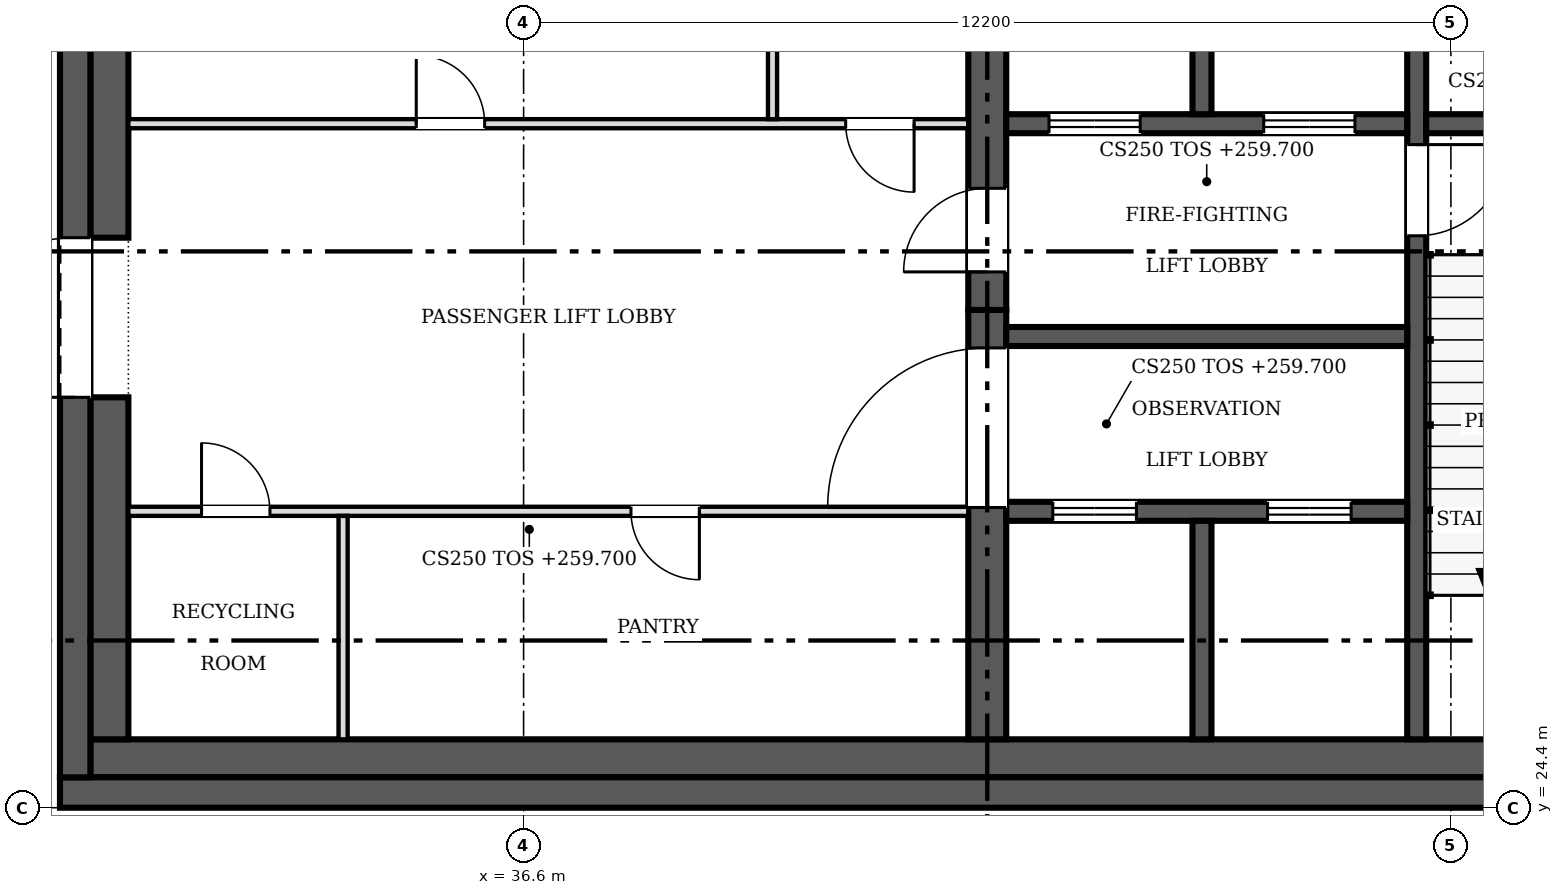
"""IFC4 building model, lengths in metres.
Left out: names, types, materials, properties, quantities, classifications, styles, units other than length and angle.
Written with IfcOpenShell. Run it as: python <this file> out.ifc"""

import sys

from ifc_helpers import new_model, si_unit, direction, frame, frame_2d, origin, place, context, subcontext, project, spatial, rectangle, extrude, source, transform, mapped, element, fill, save


model = new_model("IFC4")
c1 = context("Model", 3, precision=1e-05, world=origin(), true_north=direction((0.0, 1.0)))
c2 = subcontext(c1, "Body", "Model", "MODEL_VIEW")
j1 = project(units=[si_unit("LENGTHUNIT", "METRE"), si_unit("PLANEANGLEUNIT", "RADIAN")], contexts=[c1])
p1 = place(None, origin())
s1 = spatial("IfcSite", under=j1, at=p1, CompositionType="ELEMENT")
p2 = place(p1, origin())
s2 = spatial("IfcBuilding", under=s1, at=p2, CompositionType="ELEMENT")
p3 = place(p2, frame((0.0, 0.0, 259.7)))
s3 = spatial("IfcBuildingStorey", under=s2, at=p3, CompositionType="ELEMENT", Elevation=259.7)
p4 = place(p3, frame((54.9, 24.6, 0.0), z_axis=(0.0, 0.0, 1.0), x_axis=(-1.0, 0.0, 0.0)))
e1 = element("IfcWall", 1, at=p4, inside=s3, PredefinedType="SHEAR", context=c2, shape_type="SweptSolid", body=[
    extrude(rectangle(XDim=24.4, YDim=0.4, at=frame_2d((12.2, 0.0))), origin(), (0.0, 0.0, 1.0), 6.0),
])
m1 = source(origin(), c2, "Body", "SweptSolid", [
    extrude(rectangle(XDim=1.2, YDim=2.1, at=frame_2d((0.6, 1.05))), frame((0.0, 0.21, 0.0), z_axis=(0.0, -1.0, 0.0), x_axis=(1.0, 0.0, 0.0)), (0.0, 0.0, 1.0), 0.42),
])
p5 = place(p4, frame((1.5, 0.0, 0.0)))
e2 = element("IfcOpeningElement", 2, at=p5, cuts=e1, PredefinedType="OPENING", context=c2, shape_type="MappedRepresentation", body=[
    mapped(m1, transform((0.0, 0.0, 0.0), scale=1.0)),
])
p6 = place(p3, frame((30.7, 24.8, 0.0), z_axis=(0.0, 0.0, 1.0), x_axis=(0.0, 1.0, 0.0)))
e3 = element("IfcWall", 3, at=p6, inside=s3, PredefinedType="SHEAR", context=c2, shape_type="SweptSolid", body=[
    extrude(rectangle(XDim=23.6, YDim=0.4, at=frame_2d((11.8, 0.0))), origin(), (0.0, 0.0, 1.0), 6.0),
])
m2 = source(origin(), c2, "Body", "SweptSolid", [
    extrude(rectangle(XDim=2.1, YDim=2.4, at=frame_2d((1.05, 1.2))), frame((0.0, 0.21, 0.0), z_axis=(0.0, -1.0, 0.0), x_axis=(1.0, 0.0, 0.0)), (0.0, 0.0, 1.0), 0.42),
])
p7 = place(p6, frame((5.0, 0.0, 0.0)))
e4 = element("IfcOpeningElement", 4, at=p7, cuts=e3, PredefinedType="OPENING", context=c2, shape_type="MappedRepresentation", body=[
    mapped(m2, transform((0.0, 0.0, 0.0), scale=1.0)),
])
p8 = place(p6, frame((16.5, 0.0, 0.0)))
e5 = element("IfcOpeningElement", 5, at=p8, cuts=e3, PredefinedType="OPENING", context=c2, shape_type="MappedRepresentation", body=[
    mapped(m2, transform((0.0, 0.0, 0.0), scale=1.0)),
])
p9 = place(p3, frame((30.9, 25.05, 0.0), z_axis=(0.0, 0.0, 1.0), x_axis=(1.0, 0.0, 0.0)))
e6 = element("IfcWall", 6, at=p9, inside=s3, PredefinedType="SOLIDWALL", context=c2, shape_type="SweptSolid", body=[
    extrude(rectangle(XDim=21.3, YDim=0.5, at=frame_2d((10.65, 0.0))), origin(), (0.0, 0.0, 1.0), 6.0),
])
p10 = place(p3, frame((31.15, 25.3, 0.0), z_axis=(0.0, 0.0, 1.0), x_axis=(0.0, 1.0, 0.0)))
e7 = element("IfcWall", 7, at=p10, inside=s3, PredefinedType="SOLIDWALL", context=c2, shape_type="SweptSolid", body=[
    extrude(rectangle(XDim=4.5, YDim=0.5, at=frame_2d((2.25, 0.0))), origin(), (0.0, 0.0, 1.0), 6.0),
])
p11 = place(p3, frame((31.15, 31.9, 0.0), z_axis=(0.0, 0.0, 1.0), x_axis=(0.0, 1.0, 0.0)))
e8 = element("IfcWall", 8, at=p11, inside=s3, PredefinedType="SOLIDWALL", context=c2, shape_type="SweptSolid", body=[
    extrude(rectangle(XDim=9.4, YDim=0.5, at=frame_2d((4.7, 0.0))), origin(), (0.0, 0.0, 1.0), 6.0),
])
p12 = place(p3, frame((42.7, 25.3, 0.0), z_axis=(0.0, 0.0, 1.0), x_axis=(0.0, 1.0, 0.0)))
e9 = element("IfcWall", 9, at=p12, inside=s3, PredefinedType="SHEAR", context=c2, shape_type="SweptSolid", body=[
    extrude(rectangle(XDim=5.65, YDim=0.5, at=frame_2d((2.825, 0.0))), origin(), (0.0, 0.0, 1.0), 6.0),
])
m3 = source(origin(), c2, "Body", "SweptSolid", [
    extrude(rectangle(XDim=2.1, YDim=2.4, at=frame_2d((1.05, 1.2))), frame((0.0, 0.26, 0.0), z_axis=(0.0, -1.0, 0.0), x_axis=(1.0, 0.0, 0.0)), (0.0, 0.0, 1.0), 0.52),
])
p13 = place(p12, frame((3.05, 0.0, 0.0)))
e10 = element("IfcOpeningElement", 10, at=p13, cuts=e9, PredefinedType="OPENING", context=c2, shape_type="MappedRepresentation", body=[
    mapped(m3, transform((0.0, 0.0, 0.0), scale=1.0)),
])
p14 = place(p3, frame((42.7, 36.35, 0.0), z_axis=(0.0, 0.0, 1.0), x_axis=(0.0, -1.0, 0.0)))
e11 = element("IfcWall", 11, at=p14, inside=s3, PredefinedType="SHEAR", context=c2, shape_type="SweptSolid", body=[
    extrude(rectangle(XDim=5.4, YDim=0.5, at=frame_2d((2.7, 0.0))), origin(), (0.0, 0.0, 1.0), 6.0),
])
m4 = source(origin(), c2, "Body", "SweptSolid", [
    extrude(rectangle(XDim=1.1, YDim=2.1, at=frame_2d((0.55, 1.05))), frame((0.0, 0.26, 0.0), z_axis=(0.0, -1.0, 0.0), x_axis=(1.0, 0.0, 0.0)), (0.0, 0.0, 1.0), 0.52),
])
p15 = place(p14, frame((3.8, 0.0, 0.0)))
e12 = element("IfcOpeningElement", 12, at=p15, cuts=e11, PredefinedType="OPENING", context=c2, shape_type="MappedRepresentation", body=[
    mapped(m4, transform((0.0, 0.0, 0.0), scale=1.0)),
])
p16 = place(p3, frame((48.35, 36.35, 0.0), z_axis=(0.0, 0.0, 1.0), x_axis=(0.0, -1.0, 0.0)))
e13 = element("IfcWall", 13, at=p16, inside=s3, PredefinedType="SOLIDWALL", context=c2, shape_type="SweptSolid", body=[
    extrude(rectangle(XDim=11.05, YDim=0.25, at=frame_2d((5.525, 0.0))), origin(), (0.0, 0.0, 1.0), 6.0),
])
m5 = source(origin(), c2, "Body", "SweptSolid", [
    extrude(rectangle(XDim=1.2, YDim=2.1, at=frame_2d((0.6, 1.05))), frame((0.0, 0.135, 0.0), z_axis=(0.0, -1.0, 0.0), x_axis=(1.0, 0.0, 0.0)), (0.0, 0.0, 1.0), 0.27),
])
p17 = place(p16, frame((3.225, 0.0, 0.0)))
e14 = element("IfcOpeningElement", 14, at=p17, cuts=e13, PredefinedType="OPENING", context=c2, shape_type="MappedRepresentation", body=[
    mapped(m5, transform((0.0, 0.0, 0.0), scale=1.0)),
])
p18 = place(p3, frame((48.225, 33.4, 0.0), z_axis=(0.0, 0.0, 1.0), x_axis=(-1.0, 0.0, 0.0)))
e15 = element("IfcWall", 15, at=p18, inside=s3, PredefinedType="SOLIDWALL", context=c2, shape_type="SweptSolid", body=[
    extrude(rectangle(XDim=5.275, YDim=0.25, at=frame_2d((2.638, 0.0))), origin(), (0.0, 0.0, 1.0), 6.0),
])
p19 = place(p18, frame((3.512, 0.0, 0.0)))
e16 = element("IfcOpeningElement", 16, at=p19, cuts=e15, PredefinedType="OPENING", context=c2, shape_type="MappedRepresentation", body=[
    mapped(m5, transform((0.0, 0.0, 0.0), scale=1.0)),
])
p20 = place(p18, frame((0.688, 0.0, 0.0)))
e17 = element("IfcOpeningElement", 17, at=p20, cuts=e15, PredefinedType="OPENING", context=c2, shape_type="MappedRepresentation", body=[
    mapped(m5, transform((0.0, 0.0, 0.0), scale=1.0)),
])
p21 = place(p3, frame((48.475, 33.4, 0.0), z_axis=(0.0, 0.0, 1.0), x_axis=(1.0, 0.0, 0.0)))
e18 = element("IfcWall", 18, at=p21, inside=s3, PredefinedType="SOLIDWALL", context=c2, shape_type="SweptSolid", body=[
    extrude(rectangle(XDim=3.525, YDim=0.25, at=frame_2d((1.762, 0.0))), origin(), (0.0, 0.0, 1.0), 6.0),
])
p22 = place(p3, frame((42.95, 28.3, 0.0), z_axis=(0.0, 0.0, 1.0), x_axis=(1.0, 0.0, 0.0)))
e19 = element("IfcWall", 19, at=p22, inside=s3, PredefinedType="SOLIDWALL", context=c2, shape_type="SweptSolid", body=[
    extrude(rectangle(XDim=5.275, YDim=0.25, at=frame_2d((2.638, 0.0))), origin(), (0.0, 0.0, 1.0), 6.0),
])
m6 = source(origin(), c2, "Body", "SweptSolid", [
    extrude(rectangle(XDim=1.1, YDim=2.1, at=frame_2d((0.55, 1.05))), frame((0.0, 0.135, 0.0), z_axis=(0.0, -1.0, 0.0), x_axis=(1.0, 0.0, 0.0)), (0.0, 0.0, 1.0), 0.27),
])
p23 = place(p22, frame((0.613, 0.0, 0.0)))
e20 = element("IfcOpeningElement", 20, at=p23, cuts=e19, PredefinedType="OPENING", context=c2, shape_type="MappedRepresentation", body=[
    mapped(m6, transform((0.0, 0.0, 0.0), scale=1.0)),
])
p24 = place(p22, frame((3.438, 0.0, 0.0)))
e21 = element("IfcOpeningElement", 21, at=p24, cuts=e19, PredefinedType="OPENING", context=c2, shape_type="MappedRepresentation", body=[
    mapped(m6, transform((0.0, 0.0, 0.0), scale=1.0)),
])
p25 = place(p3, frame((42.95, 30.6, 0.0), z_axis=(0.0, 0.0, 1.0), x_axis=(1.0, 0.0, 0.0)))
e22 = element("IfcWall", 22, at=p25, inside=s3, PredefinedType="SOLIDWALL", context=c2, shape_type="SweptSolid", body=[
    extrude(rectangle(XDim=5.275, YDim=0.25, at=frame_2d((2.638, 0.0))), origin(), (0.0, 0.0, 1.0), 6.0),
])
p26 = place(p3, frame((45.525, 33.525, 0.0), z_axis=(0.0, 0.0, 1.0), x_axis=(0.0, 1.0, 0.0)))
e23 = element("IfcWall", 23, at=p26, inside=s3, PredefinedType="SOLIDWALL", context=c2, shape_type="SweptSolid", body=[
    extrude(rectangle(XDim=2.825, YDim=0.25, at=frame_2d((1.413, 0.0))), origin(), (0.0, 0.0, 1.0), 6.0),
])
p27 = place(p3, frame((45.525, 25.3, 0.0), z_axis=(0.0, 0.0, 1.0), x_axis=(0.0, 1.0, 0.0)))
e24 = element("IfcWall", 24, at=p27, inside=s3, PredefinedType="SOLIDWALL", context=c2, shape_type="SweptSolid", body=[
    extrude(rectangle(XDim=2.875, YDim=0.25, at=frame_2d((1.438, 0.0))), origin(), (0.0, 0.0, 1.0), 6.0),
])
p28 = place(p3, frame((42.45, 28.3, 0.0), z_axis=(0.0, 0.0, 1.0), x_axis=(-1.0, 0.0, 0.0)))
e25 = element("IfcWall", 25, at=p28, inside=s3, PredefinedType="PARTITIONING", context=c2, shape_type="SweptSolid", body=[
    extrude(rectangle(XDim=11.05, YDim=0.12, at=frame_2d((5.525, 0.0))), origin(), (0.0, 0.0, 1.0), 5.75),
])
m7 = source(origin(), c2, "Body", "SweptSolid", [
    extrude(rectangle(XDim=0.9, YDim=2.1, at=frame_2d((0.45, 1.05))), frame((0.0, 0.07, 0.0), z_axis=(0.0, -1.0, 0.0), x_axis=(1.0, 0.0, 0.0)), (0.0, 0.0, 1.0), 0.14),
])
p29 = place(p28, frame((9.188, 0.0, 0.0)))
e26 = element("IfcOpeningElement", 26, at=p29, cuts=e25, PredefinedType="OPENING", context=c2, shape_type="MappedRepresentation", body=[
    mapped(m7, transform((0.0, 0.0, 0.0), scale=1.0)),
])
p30 = place(p28, frame((3.538, 0.0, 0.0)))
e27 = element("IfcOpeningElement", 27, at=p30, cuts=e25, PredefinedType="OPENING", context=c2, shape_type="MappedRepresentation", body=[
    mapped(m7, transform((0.0, 0.0, 0.0), scale=1.0)),
])
p31 = place(p3, frame((31.4, 33.4, 0.0), z_axis=(0.0, 0.0, 1.0), x_axis=(1.0, 0.0, 0.0)))
e28 = element("IfcWall", 28, at=p31, inside=s3, PredefinedType="PARTITIONING", context=c2, shape_type="SweptSolid", body=[
    extrude(rectangle(XDim=11.05, YDim=0.12, at=frame_2d((5.525, 0.0))), origin(), (0.0, 0.0, 1.0), 5.75),
])
p32 = place(p31, frame((3.788, 0.0, 0.0)))
e29 = element("IfcOpeningElement", 29, at=p32, cuts=e28, PredefinedType="OPENING", context=c2, shape_type="MappedRepresentation", body=[
    mapped(m7, transform((0.0, 0.0, 0.0), scale=1.0)),
])
p33 = place(p31, frame((9.438, 0.0, 0.0)))
e30 = element("IfcOpeningElement", 30, at=p33, cuts=e28, PredefinedType="OPENING", context=c2, shape_type="MappedRepresentation", body=[
    mapped(m7, transform((0.0, 0.0, 0.0), scale=1.0)),
])
p34 = place(p3, frame((39.875, 33.46, 0.0), z_axis=(0.0, 0.0, 1.0), x_axis=(0.0, 1.0, 0.0)))
e31 = element("IfcWall", 31, at=p34, inside=s3, PredefinedType="PARTITIONING", context=c2, shape_type="SweptSolid", body=[
    extrude(rectangle(XDim=2.89, YDim=0.12, at=frame_2d((1.445, 0.0))), origin(), (0.0, 0.0, 1.0), 5.75),
])
p35 = place(p3, frame((34.225, 25.3, 0.0), z_axis=(0.0, 0.0, 1.0), x_axis=(0.0, 1.0, 0.0)))
e32 = element("IfcWall", 32, at=p35, inside=s3, PredefinedType="PARTITIONING", context=c2, shape_type="SweptSolid", body=[
    extrude(rectangle(XDim=2.94, YDim=0.12, at=frame_2d((1.47, 0.0))), origin(), (0.0, 0.0, 1.0), 5.75),
])
m8 = source(origin(), c2, "Body", "SweptSolid", [
    extrude(rectangle(XDim=2.1, YDim=2.4, at=frame_2d((1.05, 1.2))), frame((0.0, 0.025, 0.0), z_axis=(0.0, -1.0, 0.0), x_axis=(1.0, 0.0, 0.0)), (0.0, 0.0, 1.0), 0.05),
])
p36 = place(p7, origin())
e33 = element("IfcDoor", 33, at=p36, inside=s3, OperationType="DOUBLE_DOOR_SINGLE_SWING", PredefinedType="DOOR", context=c2, shape_type="MappedRepresentation", body=[
    mapped(m8, transform((0.0, 0.0, 0.0), scale=1.0)),
])
fill(e4, e33)
p37 = place(p13, origin())
e34 = element("IfcDoor", 34, at=p37, inside=s3, OperationType="DOUBLE_DOOR_SINGLE_SWING", PredefinedType="DOOR", context=c2, shape_type="MappedRepresentation", body=[
    mapped(m8, transform((0.0, 0.0, 0.0), scale=1.0)),
])
fill(e10, e34)
m9 = source(origin(), c2, "Body", "SweptSolid", [
    extrude(rectangle(XDim=1.1, YDim=2.1, at=frame_2d((0.55, 1.05))), frame((0.0, 0.025, 0.0), z_axis=(0.0, -1.0, 0.0), x_axis=(1.0, 0.0, 0.0)), (0.0, 0.0, 1.0), 0.05),
])
p38 = place(p15, origin())
e35 = element("IfcDoor", 35, at=p38, inside=s3, OperationType="SINGLE_SWING_RIGHT", PredefinedType="DOOR", context=c2, shape_type="MappedRepresentation", body=[
    mapped(m9, transform((0.0, 0.0, 0.0), scale=1.0)),
])
fill(e12, e35)
m10 = source(origin(), c2, "Body", "SweptSolid", [
    extrude(rectangle(XDim=1.2, YDim=2.1, at=frame_2d((0.6, 1.05))), frame((0.0, 0.025, 0.0), z_axis=(0.0, -1.0, 0.0), x_axis=(1.0, 0.0, 0.0)), (0.0, 0.0, 1.0), 0.05),
])
p39 = place(p17, origin())
e36 = element("IfcDoor", 36, at=p39, inside=s3, OperationType="SINGLE_SWING_LEFT", PredefinedType="DOOR", context=c2, shape_type="MappedRepresentation", body=[
    mapped(m10, transform((0.0, 0.0, 0.0), scale=1.0)),
])
fill(e14, e36)
p40 = place(p19, origin())
e37 = element("IfcDoor", 37, at=p40, inside=s3, OperationType="DOUBLE_DOOR_SLIDING", PredefinedType="DOOR", context=c2, shape_type="MappedRepresentation", body=[
    mapped(m10, transform((0.0, 0.0, 0.0), scale=1.0)),
])
fill(e16, e37)
p41 = place(p20, origin())
e38 = element("IfcDoor", 38, at=p41, inside=s3, OperationType="DOUBLE_DOOR_SLIDING", PredefinedType="DOOR", context=c2, shape_type="MappedRepresentation", body=[
    mapped(m10, transform((0.0, 0.0, 0.0), scale=1.0)),
])
fill(e17, e38)
p42 = place(p23, origin())
e39 = element("IfcDoor", 39, at=p42, inside=s3, OperationType="DOUBLE_DOOR_SLIDING", PredefinedType="DOOR", context=c2, shape_type="MappedRepresentation", body=[
    mapped(m9, transform((0.0, 0.0, 0.0), scale=1.0)),
])
fill(e20, e39)
p43 = place(p24, origin())
e40 = element("IfcDoor", 40, at=p43, inside=s3, OperationType="DOUBLE_DOOR_SLIDING", PredefinedType="DOOR", context=c2, shape_type="MappedRepresentation", body=[
    mapped(m9, transform((0.0, 0.0, 0.0), scale=1.0)),
])
fill(e21, e40)
m11 = source(origin(), c2, "Body", "SweptSolid", [
    extrude(rectangle(XDim=0.9, YDim=2.1, at=frame_2d((0.45, 1.05))), frame((0.0, 0.025, 0.0), z_axis=(0.0, -1.0, 0.0), x_axis=(1.0, 0.0, 0.0)), (0.0, 0.0, 1.0), 0.05),
])
p44 = place(p29, origin())
e41 = element("IfcDoor", 41, at=p44, inside=s3, OperationType="SINGLE_SWING_RIGHT", PredefinedType="DOOR", context=c2, shape_type="MappedRepresentation", body=[
    mapped(m11, transform((0.0, 0.0, 0.0), scale=1.0)),
])
fill(e26, e41)
p45 = place(p30, origin())
e42 = element("IfcDoor", 42, at=p45, inside=s3, OperationType="SINGLE_SWING_LEFT", PredefinedType="DOOR", context=c2, shape_type="MappedRepresentation", body=[
    mapped(m11, transform((0.0, 0.0, 0.0), scale=1.0)),
])
fill(e27, e42)
p46 = place(p32, origin())
e43 = element("IfcDoor", 43, at=p46, inside=s3, OperationType="SINGLE_SWING_LEFT", PredefinedType="DOOR", context=c2, shape_type="MappedRepresentation", body=[
    mapped(m11, transform((0.0, 0.0, 0.0), scale=1.0)),
])
fill(e29, e43)
p47 = place(p33, origin())
e44 = element("IfcDoor", 44, at=p47, inside=s3, OperationType="SINGLE_SWING_RIGHT", PredefinedType="DOOR", context=c2, shape_type="MappedRepresentation", body=[
    mapped(m11, transform((0.0, 0.0, 0.0), scale=1.0)),
])
fill(e30, e44)
save(model, sys.argv[1])
